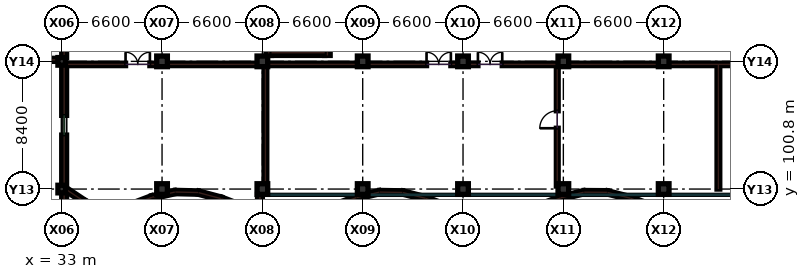
"""IFC4 building model, lengths in metres.
Left out: names, types, materials, properties, quantities, classifications, styles, units other than length and angle.
Written with IfcOpenShell. Run it as: python <this file> out.ifc"""

import sys

from ifc_helpers import new_model, si_unit, direction, frame, frame_2d, origin, origin_2d, place, context, subcontext, project, spatial, rectangle, extrude, element, fill, save


model = new_model("IFC4")
c1 = context("Model", 3, precision=1e-05, world=origin(), true_north=direction((0.0, 1.0)))
c2 = subcontext(c1, "Body", "Model", "MODEL_VIEW")
j1 = project(units=[si_unit("LENGTHUNIT", "METRE"), si_unit("PLANEANGLEUNIT", "RADIAN")], contexts=[c1])
p1 = place(None, origin())
s1 = spatial("IfcSite", under=j1, at=p1, CompositionType="ELEMENT")
p2 = place(p1, origin())
s2 = spatial("IfcBuilding", under=s1, at=p2, CompositionType="ELEMENT")
p3 = place(p2, frame((0.0, 0.0, 5.4)))
s3 = spatial("IfcBuildingStorey", under=s2, at=p3, CompositionType="ELEMENT", Elevation=5.4)
for number, where, z_axis, x_axis in (
    (1, (33.0, 100.8, 0.0), (0.0, 0.0, 1.0), (1.0, 0.0, 0.0)),
    (2, (33.0, 109.2, 0.0), (0.0, 0.0, 1.0), (1.0, 0.0, 0.0)),
):
    element("IfcColumn", number, at=place(p3, frame(where, z_axis=z_axis, x_axis=x_axis)), inside=s3, PredefinedType="COLUMN", context=c2, shape_type="SweptSolid", body=[
        extrude(rectangle(XDim=0.5, YDim=0.5, at=origin_2d()), origin(), (0.0, 0.0, 1.0), 4.5),
    ])
for number, where, z_axis, x_axis in (
    (3, (39.6, 100.8, 0.0), (0.0, 0.0, 1.0), (1.0, 0.0, 0.0)),
    (4, (39.6, 109.2, 0.0), (0.0, 0.0, 1.0), (1.0, 0.0, 0.0)),
    (5, (46.2, 100.8, 0.0), (0.0, 0.0, 1.0), (1.0, 0.0, 0.0)),
    (6, (46.2, 109.2, 0.0), (0.0, 0.0, 1.0), (1.0, 0.0, 0.0)),
    (7, (52.8, 100.8, 0.0), (0.0, 0.0, 1.0), (1.0, 0.0, 0.0)),
    (8, (52.8, 109.2, 0.0), (0.0, 0.0, 1.0), (1.0, 0.0, 0.0)),
    (9, (59.4, 100.8, 0.0), (0.0, 0.0, 1.0), (1.0, 0.0, 0.0)),
    (10, (59.4, 109.2, 0.0), (0.0, 0.0, 1.0), (1.0, 0.0, 0.0)),
    (11, (66.0, 100.8, 0.0), (0.0, 0.0, 1.0), (1.0, 0.0, 0.0)),
    (12, (66.0, 109.2, 0.0), (0.0, 0.0, 1.0), (1.0, 0.0, 0.0)),
    (13, (72.6, 100.8, 0.0), (0.0, 0.0, 1.0), (1.0, 0.0, 0.0)),
    (14, (72.6, 109.2, 0.0), (0.0, 0.0, 1.0), (1.0, 0.0, 0.0)),
):
    element("IfcColumn", number, at=place(p3, frame(where, z_axis=z_axis, x_axis=x_axis)), inside=s3, PredefinedType="COLUMN", context=c2, shape_type="SweptSolid", body=[
        extrude(rectangle(XDim=0.7, YDim=0.7, at=origin_2d()), origin(), (0.0, 0.0, 1.0), 4.5),
    ])
p4 = place(p3, frame((33.32, 109.0, 0.0), z_axis=(0.0, 0.0, 1.0), x_axis=(1.0, 0.0, 0.0)))
e15 = element("IfcWall", 15, at=p4, inside=s3, PredefinedType="PARTITIONING", context=c2, shape_type="SweptSolid", body=[
    extrude(rectangle(XDim=5.83, YDim=0.16, at=frame_2d((2.915, 0.0))), origin(), (0.0, 0.0, 1.0), 3.435),
])
p5 = place(p4, frame((3.88, 0.0, 0.0)))
e16 = element("IfcOpeningElement", 16, at=p5, cuts=e15, PredefinedType="OPENING", context=c2, shape_type="SweptSolid", body=[
    extrude(rectangle(XDim=1.6, YDim=2.2, at=frame_2d((0.8, 1.1))), frame((0.0, 0.09, 0.0), z_axis=(0.0, -1.0, 0.0), x_axis=(1.0, 0.0, 0.0)), (0.0, 0.0, 1.0), 0.18),
])
p6 = place(p3, frame((40.05, 109.0, 0.0), z_axis=(0.0, 0.0, 1.0), x_axis=(1.0, 0.0, 0.0)))
e17 = element("IfcWall", 17, at=p6, inside=s3, PredefinedType="PARTITIONING", context=c2, shape_type="SweptSolid", body=[
    extrude(rectangle(XDim=5.7, YDim=0.16, at=frame_2d((2.85, 0.0))), origin(), (0.0, 0.0, 1.0), 3.435),
])
p7 = place(p3, frame((46.65, 109.0, 0.0), z_axis=(0.0, 0.0, 1.0), x_axis=(1.0, 0.0, 0.0)))
e18 = element("IfcWall", 18, at=p7, inside=s3, PredefinedType="PARTITIONING", context=c2, shape_type="SweptSolid", body=[
    extrude(rectangle(XDim=5.7, YDim=0.16, at=frame_2d((2.85, 0.0))), origin(), (0.0, 0.0, 1.0), 3.435),
])
p8 = place(p3, frame((53.25, 109.0, 0.0), z_axis=(0.0, 0.0, 1.0), x_axis=(1.0, 0.0, 0.0)))
e19 = element("IfcWall", 19, at=p8, inside=s3, PredefinedType="PARTITIONING", context=c2, shape_type="SweptSolid", body=[
    extrude(rectangle(XDim=5.7, YDim=0.16, at=frame_2d((2.85, 0.0))), origin(), (0.0, 0.0, 1.0), 3.435),
])
p9 = place(p8, frame((3.75, 0.0, 0.0)))
e20 = element("IfcOpeningElement", 20, at=p9, cuts=e19, PredefinedType="OPENING", context=c2, shape_type="SweptSolid", body=[
    extrude(rectangle(XDim=1.6, YDim=2.2, at=frame_2d((0.8, 1.1))), frame((0.0, 0.09, 0.0), z_axis=(0.0, -1.0, 0.0), x_axis=(1.0, 0.0, 0.0)), (0.0, 0.0, 1.0), 0.18),
])
p10 = place(p3, frame((59.85, 109.0, 0.0), z_axis=(0.0, 0.0, 1.0), x_axis=(1.0, 0.0, 0.0)))
e21 = element("IfcWall", 21, at=p10, inside=s3, PredefinedType="PARTITIONING", context=c2, shape_type="SweptSolid", body=[
    extrude(rectangle(XDim=5.7, YDim=0.16, at=frame_2d((2.85, 0.0))), origin(), (0.0, 0.0, 1.0), 3.435),
])
p11 = place(p10, frame((0.53, 0.0, 0.0)))
e22 = element("IfcOpeningElement", 22, at=p11, cuts=e21, PredefinedType="OPENING", context=c2, shape_type="SweptSolid", body=[
    extrude(rectangle(XDim=1.6, YDim=2.2, at=frame_2d((0.8, 1.1))), frame((0.0, 0.09, 0.0), z_axis=(0.0, -1.0, 0.0), x_axis=(1.0, 0.0, 0.0)), (0.0, 0.0, 1.0), 0.18),
])
for number, where, z_axis, x_axis in (
    (23, (66.45, 109.0, 0.0), (0.0, 0.0, 1.0), (1.0, 0.0, 0.0)),
    (24, (73.05, 109.0, 0.0), (0.0, 0.0, 1.0), (1.0, 0.0, 0.0)),
):
    element("IfcWall", number, at=place(p3, frame(where, z_axis=z_axis, x_axis=x_axis)), inside=s3, PredefinedType="PARTITIONING", context=c2, shape_type="SweptSolid", body=[
        extrude(rectangle(XDim=5.7, YDim=0.16, at=frame_2d((2.85, 0.0))), origin(), (0.0, 0.0, 1.0), 3.435),
    ])
for number, where, z_axis, x_axis in (
    (25, (46.4, 100.8, 0.0), (0.0, 0.0, 1.0), (0.0, 1.0, 0.0)),
    (26, (76.2, 100.8, 0.0), (0.0, 0.0, 1.0), (0.0, 1.0, 0.0)),
):
    element("IfcWall", number, at=place(p3, frame(where, z_axis=z_axis, x_axis=x_axis)), inside=s3, PredefinedType="SOLIDWALL", context=c2, shape_type="SweptSolid", body=[
        extrude(rectangle(XDim=8.2, YDim=0.18, at=frame_2d((4.1, 0.0))), origin(), (0.0, 0.0, 1.0), 3.45),
    ])
p12 = place(p3, frame((65.6, 101.0, 0.0), z_axis=(0.0, 0.0, 1.0), x_axis=(0.0, 1.0, 0.0)))
e27 = element("IfcWall", 27, at=p12, inside=s3, PredefinedType="PARTITIONING", context=c2, shape_type="SweptSolid", body=[
    extrude(rectangle(XDim=8.0, YDim=0.12, at=frame_2d((4.0, 0.0))), origin(), (0.0, 0.0, 1.0), 3.45),
])
p13 = place(p12, frame((3.8, 0.0, 0.0)))
e28 = element("IfcOpeningElement", 28, at=p13, cuts=e27, PredefinedType="OPENING", context=c2, shape_type="SweptSolid", body=[
    extrude(rectangle(XDim=1.15, YDim=2.2, at=frame_2d((0.575, 1.1))), frame((0.0, 0.07, 0.0), z_axis=(0.0, -1.0, 0.0), x_axis=(1.0, 0.0, 0.0)), (0.0, 0.0, 1.0), 0.14),
])
p14 = place(p3, frame((33.16, 100.555, 0.0), z_axis=(0.0, 0.0, 1.0), x_axis=(0.0, -1.0, 0.0)))
e29 = element("IfcWall", 29, at=p14, inside=s3, PredefinedType="SOLIDWALL", context=c2, shape_type="SweptSolid", body=[
    extrude(rectangle(XDim=7.91, YDim=0.32, at=frame_2d((3.955, 0.0))), origin(), (0.0, 0.0, 1.0), 3.635),
])
p15 = place(p14, frame((3.43, 0.0, 0.95)))
e30 = element("IfcOpeningElement", 30, at=p15, cuts=e29, PredefinedType="OPENING", context=c2, shape_type="SweptSolid", body=[
    extrude(rectangle(XDim=1.05, YDim=1.75, at=frame_2d((0.525, 0.875))), frame((0.0, 0.17, 0.0), z_axis=(0.0, -1.0, 0.0), x_axis=(1.0, 0.0, 0.0)), (0.0, 0.0, 1.0), 0.34),
])
p16 = place(p3, frame((33.16, 108.955, 0.0), z_axis=(0.0, 0.0, 1.0), x_axis=(0.0, -1.0, 0.0)))
e31 = element("IfcWall", 31, at=p16, inside=s3, PredefinedType="SOLIDWALL", context=c2, shape_type="SweptSolid", body=[
    extrude(rectangle(XDim=7.91, YDim=0.32, at=frame_2d((3.955, 0.0))), origin(), (0.0, 0.0, 1.0), 3.485),
])
p17 = place(p16, frame((3.305, 0.0, 0.95)))
e32 = element("IfcOpeningElement", 32, at=p17, cuts=e31, PredefinedType="OPENING", context=c2, shape_type="SweptSolid", body=[
    extrude(rectangle(XDim=1.3, YDim=1.75, at=frame_2d((0.65, 0.875))), frame((0.0, 0.17, 0.0), z_axis=(0.0, -1.0, 0.0), x_axis=(1.0, 0.0, 0.0)), (0.0, 0.0, 1.0), 0.34),
])
p18 = place(p3, frame((33.16, 117.355, 0.0), z_axis=(0.0, 0.0, 1.0), x_axis=(0.0, -1.0, 0.0)))
e33 = element("IfcWall", 33, at=p18, inside=s3, PredefinedType="SOLIDWALL", context=c2, shape_type="SweptSolid", body=[
    extrude(rectangle(XDim=7.91, YDim=0.32, at=frame_2d((3.955, 0.0))), origin(), (0.0, 0.0, 1.0), 3.635),
])
p19 = place(p18, frame((3.155, 0.0, 0.95)))
e34 = element("IfcOpeningElement", 34, at=p19, cuts=e33, PredefinedType="OPENING", context=c2, shape_type="SweptSolid", body=[
    extrude(rectangle(XDim=1.6, YDim=1.85, at=frame_2d((0.8, 0.925))), frame((0.0, 0.17, 0.0), z_axis=(0.0, -1.0, 0.0), x_axis=(1.0, 0.0, 0.0)), (0.0, 0.0, 1.0), 0.34),
])
p20 = place(p3, frame((46.04, 92.645, 0.0), z_axis=(0.0, 0.0, 1.0), x_axis=(0.0, 1.0, 0.0)))
e35 = element("IfcWall", 35, at=p20, inside=s3, PredefinedType="SOLIDWALL", context=c2, shape_type="SweptSolid", body=[
    extrude(rectangle(XDim=7.81, YDim=0.32, at=frame_2d((3.905, 0.0))), origin(), (0.0, 0.0, 1.0), 3.635),
])
p21 = place(p20, frame((3.38, 0.0, 0.95)))
e36 = element("IfcOpeningElement", 36, at=p21, cuts=e35, PredefinedType="OPENING", context=c2, shape_type="SweptSolid", body=[
    extrude(rectangle(XDim=1.05, YDim=1.75, at=frame_2d((0.525, 0.875))), frame((0.0, 0.17, 0.0), z_axis=(0.0, -1.0, 0.0), x_axis=(1.0, 0.0, 0.0)), (0.0, 0.0, 1.0), 0.34),
])
p22 = place(p3, frame((33.08, 100.915, 0.0), z_axis=(0.0, 0.0, 1.0), x_axis=(0.832426581762, -0.554135349871, 0.0)))
e37 = element("IfcWall", 37, at=p22, inside=s3, PredefinedType="SOLIDWALL", context=c2, shape_type="SweptSolid", body=[
    extrude(rectangle(XDim=1.796, YDim=0.22, at=frame_2d((0.898, 0.0))), origin(), (0.0, 0.0, 1.0), 1.45),
])
p23 = place(p3, frame((37.435, 99.69, 0.0), z_axis=(0.0, 0.0, 1.0), x_axis=(0.935044819014, 0.354529528297, 0.0)))
e38 = element("IfcWall", 38, at=p23, inside=s3, PredefinedType="SOLIDWALL", context=c2, shape_type="SweptSolid", body=[
    extrude(rectangle(XDim=1.594, YDim=0.22, at=frame_2d((0.797, 0.0))), origin(), (0.0, 0.0, 1.0), 1.45),
])
p24 = place(p3, frame((38.945, 100.26, 0.0), z_axis=(0.0, 0.0, 1.0), x_axis=(0.975084338019, 0.221834473765, 0.0)))
e39 = element("IfcWall", 39, at=p24, inside=s3, PredefinedType="SOLIDWALL", context=c2, shape_type="SweptSolid", body=[
    extrude(rectangle(XDim=1.533, YDim=0.22, at=frame_2d((0.767, 0.0))), origin(), (0.0, 0.0, 1.0), 1.45),
])
p25 = place(p3, frame((40.475, 100.605, 0.0), z_axis=(0.0, 0.0, 1.0), x_axis=(0.999727393664, -0.023348198154, 0.0)))
e40 = element("IfcWall", 40, at=p25, inside=s3, PredefinedType="SOLIDWALL", context=c2, shape_type="SweptSolid", body=[
    extrude(rectangle(XDim=1.495, YDim=0.22, at=frame_2d((0.748, 0.0))), origin(), (0.0, 0.0, 1.0), 1.45),
])
p26 = place(p3, frame((42.0, 100.565, 0.0), z_axis=(0.0, 0.0, 1.0), x_axis=(0.966040919429, -0.258389129005, 0.0)))
e41 = element("IfcWall", 41, at=p26, inside=s3, PredefinedType="SOLIDWALL", context=c2, shape_type="SweptSolid", body=[
    extrude(rectangle(XDim=1.548, YDim=0.22, at=frame_2d((0.774, 0.0))), origin(), (0.0, 0.0, 1.0), 1.45),
])
p27 = place(p3, frame((43.51, 100.16, 0.0), z_axis=(0.0, 0.0, 1.0), x_axis=(0.933345606203, -0.358979079309, 0.0)))
e42 = element("IfcWall", 42, at=p27, inside=s3, PredefinedType="SOLIDWALL", context=c2, shape_type="SweptSolid", body=[
    extrude(rectangle(XDim=1.602, YDim=0.22, at=frame_2d((0.801, 0.0))), origin(), (0.0, 0.0, 1.0), 1.45),
])
p28 = place(p3, frame((50.88, 99.67, 0.0), z_axis=(0.0, 0.0, 1.0), x_axis=(0.935396889245, 0.353599575213, 0.0)))
e43 = element("IfcWall", 43, at=p28, inside=s3, PredefinedType="SOLIDWALL", context=c2, shape_type="SweptSolid", body=[
    extrude(rectangle(XDim=1.598, YDim=0.22, at=frame_2d((0.799, 0.0))), origin(), (0.0, 0.0, 1.0), 1.45),
])
p29 = place(p3, frame((52.395, 100.24, 0.0), z_axis=(0.0, 0.0, 1.0), x_axis=(0.972944141478, 0.231040467371, 0.0)))
e44 = element("IfcWall", 44, at=p29, inside=s3, PredefinedType="SOLIDWALL", context=c2, shape_type="SweptSolid", body=[
    extrude(rectangle(XDim=1.536, YDim=0.22, at=frame_2d((0.768, 0.0))), origin(), (0.0, 0.0, 1.0), 1.45),
])
p30 = place(p3, frame((53.92, 100.6, 0.0), z_axis=(0.0, 0.0, 1.0), x_axis=(0.999858589401, -0.016816694107, 0.0)))
e45 = element("IfcWall", 45, at=p30, inside=s3, PredefinedType="SOLIDWALL", context=c2, shape_type="SweptSolid", body=[
    extrude(rectangle(XDim=1.495, YDim=0.22, at=frame_2d((0.748, 0.0))), origin(), (0.0, 0.0, 1.0), 1.45),
])
p31 = place(p3, frame((55.45, 100.57, 0.0), z_axis=(0.0, 0.0, 1.0), x_axis=(0.968406785453, -0.249375816567, 0.0)))
e46 = element("IfcWall", 46, at=p31, inside=s3, PredefinedType="SOLIDWALL", context=c2, shape_type="SweptSolid", body=[
    extrude(rectangle(XDim=1.544, YDim=0.22, at=frame_2d((0.772, 0.0))), origin(), (0.0, 0.0, 1.0), 1.45),
])
p32 = place(p3, frame((56.96, 100.18, 0.0), z_axis=(0.0, 0.0, 1.0), x_axis=(0.933365245405, -0.358928013215, 0.0)))
e47 = element("IfcWall", 47, at=p32, inside=s3, PredefinedType="SOLIDWALL", context=c2, shape_type="SweptSolid", body=[
    extrude(rectangle(XDim=1.602, YDim=0.22, at=frame_2d((0.801, 0.0))), origin(), (0.0, 0.0, 1.0), 1.45),
])
p33 = place(p3, frame((64.33, 99.65, 0.0), z_axis=(0.0, 0.0, 1.0), x_axis=(0.93436439089, 0.356318937241, 0.0)))
e48 = element("IfcWall", 48, at=p33, inside=s3, PredefinedType="SOLIDWALL", context=c2, shape_type="SweptSolid", body=[
    extrude(rectangle(XDim=1.6, YDim=0.22, at=frame_2d((0.8, 0.0))), origin(), (0.0, 0.0, 1.0), 1.45),
])
p34 = place(p3, frame((65.84, 100.225, 0.0), z_axis=(0.0, 0.0, 1.0), x_axis=(0.971462405428, 0.237193580943, 0.0)))
e49 = element("IfcWall", 49, at=p34, inside=s3, PredefinedType="SOLIDWALL", context=c2, shape_type="SweptSolid", body=[
    extrude(rectangle(XDim=1.539, YDim=0.22, at=frame_2d((0.77, 0.0))), origin(), (0.0, 0.0, 1.0), 1.45),
])
p35 = place(p3, frame((67.37, 100.595, 0.0), z_axis=(0.0, 0.0, 1.0), x_axis=(0.999977582117, -0.006695913909, 0.0)))
e50 = element("IfcWall", 50, at=p35, inside=s3, PredefinedType="SOLIDWALL", context=c2, shape_type="SweptSolid", body=[
    extrude(rectangle(XDim=1.495, YDim=0.22, at=frame_2d((0.748, 0.0))), origin(), (0.0, 0.0, 1.0), 1.45),
])
p36 = place(p3, frame((68.9, 100.58, 0.0), z_axis=(0.0, 0.0, 1.0), x_axis=(0.969166609432, -0.246406337506, 0.0)))
e51 = element("IfcWall", 51, at=p36, inside=s3, PredefinedType="SOLIDWALL", context=c2, shape_type="SweptSolid", body=[
    extrude(rectangle(XDim=1.543, YDim=0.22, at=frame_2d((0.771, 0.0))), origin(), (0.0, 0.0, 1.0), 1.45),
])
p37 = place(p3, frame((70.41, 100.195, 0.0), z_axis=(0.0, 0.0, 1.0), x_axis=(0.934383761217, -0.35626813887, 0.0)))
e52 = element("IfcWall", 52, at=p37, inside=s3, PredefinedType="SOLIDWALL", context=c2, shape_type="SweptSolid", body=[
    extrude(rectangle(XDim=1.6, YDim=0.22, at=frame_2d((0.8, 0.0))), origin(), (0.0, 0.0, 1.0), 1.45),
])
p38 = place(p3, frame((6.8, 109.3, 0.0), z_axis=(0.0, 0.0, 1.0), x_axis=(1.0, 0.0, 0.0)))
e53 = element("IfcWall", 53, at=p38, inside=s3, PredefinedType="PARAPET", context=c2, shape_type="SweptSolid", body=[
    extrude(rectangle(XDim=25.8, YDim=0.2, at=frame_2d((12.9, 0.0))), origin(), (0.0, 0.0, 1.0), 1.1),
])
p39 = place(p3, frame((46.62, 109.59, 0.0), z_axis=(0.0, 0.0, 1.0), x_axis=(0.0, 1.0, 0.0)))
e54 = element("IfcWall", 54, at=p39, inside=s3, PredefinedType="SHEAR", context=c2, shape_type="SweptSolid", body=[
    extrude(rectangle(XDim=7.84, YDim=0.36, at=frame_2d((3.92, 0.0))), origin(), (0.0, 0.0, 1.0), 4.2),
])
p40 = place(p3, frame((50.48, 109.59, 0.0), z_axis=(0.0, 0.0, 1.0), x_axis=(0.0, 1.0, 0.0)))
e55 = element("IfcWall", 55, at=p40, inside=s3, PredefinedType="SHEAR", context=c2, shape_type="SweptSolid", body=[
    extrude(rectangle(XDim=7.84, YDim=0.36, at=frame_2d((3.92, 0.0))), origin(), (0.0, 0.0, 1.0), 4.2),
])
p41 = place(p40, frame((0.45, 0.0, 0.0)))
e56 = element("IfcOpeningElement", 56, at=p41, cuts=e55, PredefinedType="OPENING", context=c2, shape_type="SweptSolid", body=[
    extrude(rectangle(XDim=1.25, YDim=2.15, at=frame_2d((0.625, 1.075))), frame((0.0, 0.19, 0.0), z_axis=(0.0, -1.0, 0.0), x_axis=(1.0, 0.0, 0.0)), (0.0, 0.0, 1.0), 0.38),
])
p42 = place(p3, frame((46.8, 109.77, 0.0), z_axis=(0.0, 0.0, 1.0), x_axis=(1.0, 0.0, 0.0)))
e57 = element("IfcWall", 57, at=p42, inside=s3, PredefinedType="SHEAR", context=c2, shape_type="SweptSolid", body=[
    extrude(rectangle(XDim=3.5, YDim=0.36, at=frame_2d((1.75, 0.0))), origin(), (0.0, 0.0, 1.0), 4.2),
])
p43 = place(p5, origin())
e58 = element("IfcDoor", 58, at=p43, inside=s3, OperationType="DOUBLE_DOOR_SINGLE_SWING", PredefinedType="DOOR", context=c2, shape_type="SweptSolid", body=[
    extrude(rectangle(XDim=1.6, YDim=2.2, at=frame_2d((0.8, 1.1))), frame((0.0, 0.025, 0.0), z_axis=(0.0, -1.0, 0.0), x_axis=(1.0, 0.0, 0.0)), (0.0, 0.0, 1.0), 0.05),
])
fill(e16, e58)
p44 = place(p9, origin())
e59 = element("IfcDoor", 59, at=p44, inside=s3, OperationType="DOUBLE_DOOR_SINGLE_SWING", PredefinedType="DOOR", context=c2, shape_type="SweptSolid", body=[
    extrude(rectangle(XDim=1.6, YDim=2.2, at=frame_2d((0.8, 1.1))), frame((0.0, 0.025, 0.0), z_axis=(0.0, -1.0, 0.0), x_axis=(1.0, 0.0, 0.0)), (0.0, 0.0, 1.0), 0.05),
])
fill(e20, e59)
p45 = place(p11, origin())
e60 = element("IfcDoor", 60, at=p45, inside=s3, OperationType="DOUBLE_DOOR_SINGLE_SWING", PredefinedType="DOOR", context=c2, shape_type="SweptSolid", body=[
    extrude(rectangle(XDim=1.6, YDim=2.2, at=frame_2d((0.8, 1.1))), frame((0.0, 0.025, 0.0), z_axis=(0.0, -1.0, 0.0), x_axis=(1.0, 0.0, 0.0)), (0.0, 0.0, 1.0), 0.05),
])
fill(e22, e60)
p46 = place(p13, origin())
e61 = element("IfcDoor", 61, at=p46, inside=s3, OperationType="SINGLE_SWING_LEFT", PredefinedType="DOOR", context=c2, shape_type="SweptSolid", body=[
    extrude(rectangle(XDim=1.15, YDim=2.2, at=frame_2d((0.575, 1.1))), frame((0.0, 0.025, 0.0), z_axis=(0.0, -1.0, 0.0), x_axis=(1.0, 0.0, 0.0)), (0.0, 0.0, 1.0), 0.05),
])
fill(e28, e61)
p47 = place(p17, origin())
e62 = element("IfcWindow", 62, at=p47, inside=s3, PartitioningType="SINGLE_PANEL", PredefinedType="WINDOW", context=c2, shape_type="SweptSolid", body=[
    extrude(rectangle(XDim=1.3, YDim=1.75, at=frame_2d((0.65, 0.875))), frame((0.0, 0.03, 0.0), z_axis=(0.0, -1.0, 0.0), x_axis=(1.0, 0.0, 0.0)), (0.0, 0.0, 1.0), 0.06),
])
fill(e32, e62)
save(model, sys.argv[1])
